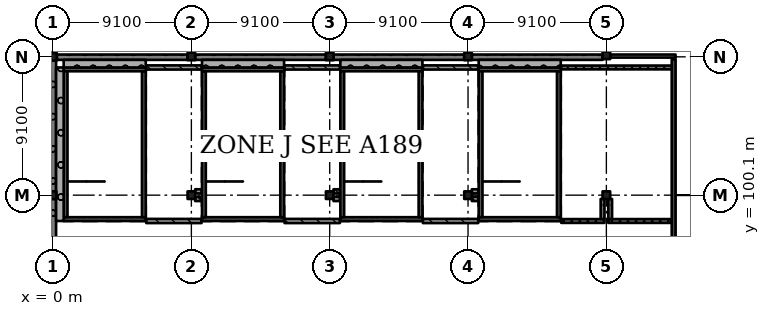
"""IFC4 building model, lengths in metres.
Left out: names, types, materials, properties, quantities, classifications, styles, units other than length and angle.
Written with IfcOpenShell. Run it as: python <this file> out.ifc"""

import sys

from ifc_helpers import new_model, si_unit, direction, frame, frame_2d, origin, origin_2d, place, context, subcontext, project, spatial, rectangle, extrude, element, fill, save


model = new_model("IFC4")
c1 = context("Model", 3, precision=1e-05, world=origin(), true_north=direction((0.0, 1.0)))
c2 = subcontext(c1, "Body", "Model", "MODEL_VIEW")
j1 = project(units=[si_unit("LENGTHUNIT", "METRE"), si_unit("PLANEANGLEUNIT", "RADIAN")], contexts=[c1])
p1 = place(None, origin())
s1 = spatial("IfcSite", under=j1, at=p1, CompositionType="ELEMENT")
p2 = place(p1, origin())
s2 = spatial("IfcBuilding", under=s1, at=p2, CompositionType="ELEMENT")
p3 = place(p2, frame((0.0, 0.0, 29.12)))
s3 = spatial("IfcBuildingStorey", under=s2, at=p3, CompositionType="ELEMENT", Elevation=29.12)
for number, where, z_axis, x_axis in (
    (1, (-0.025, 100.1, 0.0), (0.0, 0.0, 1.0), (1.0, 0.0, 0.0)),
    (2, (0.0, 109.2, 0.0), (0.0, 0.0, 1.0), (1.0, 0.0, 0.0)),
    (3, (9.1, 100.1, 0.0), (0.0, 0.0, 1.0), (1.0, 0.0, 0.0)),
    (4, (9.1, 109.225, 0.0), (0.0, 0.0, 1.0), (1.0, 0.0, 0.0)),
    (5, (18.2, 100.1, 0.0), (0.0, 0.0, 1.0), (1.0, 0.0, 0.0)),
    (6, (18.2, 109.225, 0.0), (0.0, 0.0, 1.0), (1.0, 0.0, 0.0)),
    (7, (27.3, 100.1, 0.0), (0.0, 0.0, 1.0), (1.0, 0.0, 0.0)),
    (8, (27.3, 109.225, 0.0), (0.0, 0.0, 1.0), (1.0, 0.0, 0.0)),
    (9, (36.4, 100.1, 0.0), (0.0, 0.0, 1.0), (1.0, 0.0, 0.0)),
    (10, (36.4, 109.3, 0.0), (0.0, 0.0, 1.0), (1.0, 0.0, 0.0)),
):
    element("IfcColumn", number, at=place(p3, frame(where, z_axis=z_axis, x_axis=x_axis)), inside=s3, PredefinedType="COLUMN", context=c2, shape_type="SweptSolid", body=[
        extrude(rectangle(XDim=0.5, YDim=0.5, at=origin_2d()), origin(), (0.0, 0.0, 1.0), 4.55),
    ])
p4 = place(p3, frame((40.825, 68.25, 0.0), z_axis=(0.0, 0.0, 1.0), x_axis=(0.0, 1.0, 0.0)))
e11 = element("IfcWall", 11, at=p4, inside=s3, PredefinedType="SHEAR", context=c2, shape_type="SweptSolid", body=[
    extrude(rectangle(XDim=40.775, YDim=0.25, at=frame_2d((20.387, 0.0))), origin(), (0.0, 0.0, 1.0), 4.55),
])
p5 = place(p3, frame((6.1, 98.525, 0.0), z_axis=(0.0, 0.0, 1.0), x_axis=(-1.0, 0.0, 0.0)))
e12 = element("IfcWall", 12, at=p5, inside=s3, PredefinedType="SHEAR", context=c2, shape_type="SweptSolid", body=[
    extrude(rectangle(XDim=5.4, YDim=0.25, at=frame_2d((2.7, 0.0))), origin(), (0.0, 0.0, 1.0), 4.55),
])
p6 = place(p5, frame((1.5, 0.0, 0.0)))
e13 = element("IfcOpeningElement", 13, at=p6, cuts=e12, PredefinedType="OPENING", context=c2, shape_type="SweptSolid", body=[
    extrude(rectangle(XDim=2.4, YDim=2.1, at=frame_2d((1.2, 1.05))), frame((0.0, 0.135, 0.0), z_axis=(0.0, -1.0, 0.0), x_axis=(1.0, 0.0, 0.0)), (0.0, 0.0, 1.0), 0.27),
])
p7 = place(p3, frame((6.1, 108.375, 0.0), z_axis=(0.0, 0.0, 1.0), x_axis=(-1.0, 0.0, 0.0)))
e14 = element("IfcWall", 14, at=p7, inside=s3, PredefinedType="SHEAR", context=c2, shape_type="SweptSolid", body=[
    extrude(rectangle(XDim=5.4, YDim=0.25, at=frame_2d((2.7, 0.0))), origin(), (0.0, 0.0, 1.0), 4.55),
])
for number, where, z_axis, x_axis in (
    (15, (0.825, 108.25, 0.0), (0.0, 0.0, 1.0), (0.0, -1.0, 0.0)),
    (16, (5.975, 108.25, 0.0), (0.0, 0.0, 1.0), (0.0, -1.0, 0.0)),
):
    element("IfcWall", number, at=place(p3, frame(where, z_axis=z_axis, x_axis=x_axis)), inside=s3, PredefinedType="SHEAR", context=c2, shape_type="SweptSolid", body=[
        extrude(rectangle(XDim=9.6, YDim=0.25, at=frame_2d((4.8, 0.0))), origin(), (0.0, 0.0, 1.0), 4.55),
    ])
p8 = place(p3, frame((15.2, 98.525, 0.0), z_axis=(0.0, 0.0, 1.0), x_axis=(-1.0, 0.0, 0.0)))
e17 = element("IfcWall", 17, at=p8, inside=s3, PredefinedType="SHEAR", context=c2, shape_type="SweptSolid", body=[
    extrude(rectangle(XDim=5.4, YDim=0.25, at=frame_2d((2.7, 0.0))), origin(), (0.0, 0.0, 1.0), 4.55),
])
p9 = place(p8, frame((1.5, 0.0, 0.0)))
e18 = element("IfcOpeningElement", 18, at=p9, cuts=e17, PredefinedType="OPENING", context=c2, shape_type="SweptSolid", body=[
    extrude(rectangle(XDim=2.4, YDim=2.1, at=frame_2d((1.2, 1.05))), frame((0.0, 0.135, 0.0), z_axis=(0.0, -1.0, 0.0), x_axis=(1.0, 0.0, 0.0)), (0.0, 0.0, 1.0), 0.27),
])
p10 = place(p3, frame((15.2, 108.375, 0.0), z_axis=(0.0, 0.0, 1.0), x_axis=(-1.0, 0.0, 0.0)))
e19 = element("IfcWall", 19, at=p10, inside=s3, PredefinedType="SHEAR", context=c2, shape_type="SweptSolid", body=[
    extrude(rectangle(XDim=5.4, YDim=0.25, at=frame_2d((2.7, 0.0))), origin(), (0.0, 0.0, 1.0), 4.55),
])
for number, where, z_axis, x_axis in (
    (20, (9.925, 108.25, 0.0), (0.0, 0.0, 1.0), (0.0, -1.0, 0.0)),
    (21, (15.075, 108.25, 0.0), (0.0, 0.0, 1.0), (0.0, -1.0, 0.0)),
):
    element("IfcWall", number, at=place(p3, frame(where, z_axis=z_axis, x_axis=x_axis)), inside=s3, PredefinedType="SHEAR", context=c2, shape_type="SweptSolid", body=[
        extrude(rectangle(XDim=9.6, YDim=0.25, at=frame_2d((4.8, 0.0))), origin(), (0.0, 0.0, 1.0), 4.55),
    ])
p11 = place(p3, frame((24.3, 98.525, 0.0), z_axis=(0.0, 0.0, 1.0), x_axis=(-1.0, 0.0, 0.0)))
e22 = element("IfcWall", 22, at=p11, inside=s3, PredefinedType="SHEAR", context=c2, shape_type="SweptSolid", body=[
    extrude(rectangle(XDim=5.4, YDim=0.25, at=frame_2d((2.7, 0.0))), origin(), (0.0, 0.0, 1.0), 4.55),
])
p12 = place(p11, frame((1.5, 0.0, 0.0)))
e23 = element("IfcOpeningElement", 23, at=p12, cuts=e22, PredefinedType="OPENING", context=c2, shape_type="SweptSolid", body=[
    extrude(rectangle(XDim=2.4, YDim=2.1, at=frame_2d((1.2, 1.05))), frame((0.0, 0.135, 0.0), z_axis=(0.0, -1.0, 0.0), x_axis=(1.0, 0.0, 0.0)), (0.0, 0.0, 1.0), 0.27),
])
p13 = place(p3, frame((24.3, 108.375, 0.0), z_axis=(0.0, 0.0, 1.0), x_axis=(-1.0, 0.0, 0.0)))
e24 = element("IfcWall", 24, at=p13, inside=s3, PredefinedType="SHEAR", context=c2, shape_type="SweptSolid", body=[
    extrude(rectangle(XDim=5.4, YDim=0.25, at=frame_2d((2.7, 0.0))), origin(), (0.0, 0.0, 1.0), 4.55),
])
for number, where, z_axis, x_axis in (
    (25, (19.025, 108.25, 0.0), (0.0, 0.0, 1.0), (0.0, -1.0, 0.0)),
    (26, (24.175, 108.25, 0.0), (0.0, 0.0, 1.0), (0.0, -1.0, 0.0)),
):
    element("IfcWall", number, at=place(p3, frame(where, z_axis=z_axis, x_axis=x_axis)), inside=s3, PredefinedType="SHEAR", context=c2, shape_type="SweptSolid", body=[
        extrude(rectangle(XDim=9.6, YDim=0.25, at=frame_2d((4.8, 0.0))), origin(), (0.0, 0.0, 1.0), 4.55),
    ])
p14 = place(p3, frame((33.4, 98.525, 0.0), z_axis=(0.0, 0.0, 1.0), x_axis=(-1.0, 0.0, 0.0)))
e27 = element("IfcWall", 27, at=p14, inside=s3, PredefinedType="SHEAR", context=c2, shape_type="SweptSolid", body=[
    extrude(rectangle(XDim=5.4, YDim=0.25, at=frame_2d((2.7, 0.0))), origin(), (0.0, 0.0, 1.0), 4.55),
])
p15 = place(p14, frame((1.5, 0.0, 0.0)))
e28 = element("IfcOpeningElement", 28, at=p15, cuts=e27, PredefinedType="OPENING", context=c2, shape_type="SweptSolid", body=[
    extrude(rectangle(XDim=2.4, YDim=2.1, at=frame_2d((1.2, 1.05))), frame((0.0, 0.135, 0.0), z_axis=(0.0, -1.0, 0.0), x_axis=(1.0, 0.0, 0.0)), (0.0, 0.0, 1.0), 0.27),
])
p16 = place(p3, frame((33.4, 108.375, 0.0), z_axis=(0.0, 0.0, 1.0), x_axis=(-1.0, 0.0, 0.0)))
e29 = element("IfcWall", 29, at=p16, inside=s3, PredefinedType="SHEAR", context=c2, shape_type="SweptSolid", body=[
    extrude(rectangle(XDim=5.4, YDim=0.25, at=frame_2d((2.7, 0.0))), origin(), (0.0, 0.0, 1.0), 4.55),
])
for number, where, z_axis, x_axis in (
    (30, (28.125, 108.25, 0.0), (0.0, 0.0, 1.0), (0.0, -1.0, 0.0)),
    (31, (33.275, 108.25, 0.0), (0.0, 0.0, 1.0), (0.0, -1.0, 0.0)),
):
    element("IfcWall", number, at=place(p3, frame(where, z_axis=z_axis, x_axis=x_axis)), inside=s3, PredefinedType="SHEAR", context=c2, shape_type="SweptSolid", body=[
        extrude(rectangle(XDim=9.6, YDim=0.25, at=frame_2d((4.8, 0.0))), origin(), (0.0, 0.0, 1.0), 4.55),
    ])
p17 = place(p3, frame((40.95, 109.25, 0.0), z_axis=(0.0, 0.0, 1.0), x_axis=(-1.0, 0.0, 0.0)))
e32 = element("IfcWall", 32, at=p17, inside=s3, PredefinedType="SOLIDWALL", context=c2, shape_type="SweptSolid", body=[
    extrude(rectangle(XDim=4.3, YDim=0.2, at=frame_2d((2.15, 0.0))), origin(), (0.0, 0.0, 1.0), 4.5),
])
p18 = place(p17, frame((0.65, 0.0, 0.6)))
e33 = element("IfcOpeningElement", 33, at=p18, cuts=e32, PredefinedType="OPENING", context=c2, shape_type="SweptSolid", body=[
    extrude(rectangle(XDim=3.0, YDim=3.0, at=frame_2d((1.5, 1.5))), frame((0.0, 0.11, 0.0), z_axis=(0.0, -1.0, 0.0), x_axis=(1.0, 0.0, 0.0)), (0.0, 0.0, 1.0), 0.22),
])
p19 = place(p3, frame((36.15, 109.175, 0.0), z_axis=(0.0, 0.0, 1.0), x_axis=(-1.0, 0.0, 0.0)))
e34 = element("IfcWall", 34, at=p19, inside=s3, PredefinedType="SOLIDWALL", context=c2, shape_type="SweptSolid", body=[
    extrude(rectangle(XDim=8.6, YDim=0.35, at=frame_2d((4.3, 0.0))), origin(), (0.0, 0.0, 1.0), 4.5),
])
p20 = place(p3, frame((27.05, 109.175, 0.0), z_axis=(0.0, 0.0, 1.0), x_axis=(-1.0, 0.0, 0.0)))
e35 = element("IfcWall", 35, at=p20, inside=s3, PredefinedType="SOLIDWALL", context=c2, shape_type="SweptSolid", body=[
    extrude(rectangle(XDim=8.6, YDim=0.35, at=frame_2d((4.3, 0.0))), origin(), (0.0, 0.0, 1.0), 4.5),
])
p21 = place(p3, frame((17.95, 109.175, 0.0), z_axis=(0.0, 0.0, 1.0), x_axis=(-1.0, 0.0, 0.0)))
e36 = element("IfcWall", 36, at=p21, inside=s3, PredefinedType="SOLIDWALL", context=c2, shape_type="SweptSolid", body=[
    extrude(rectangle(XDim=8.6, YDim=0.35, at=frame_2d((4.3, 0.0))), origin(), (0.0, 0.0, 1.0), 4.5),
])
p22 = place(p3, frame((8.85, 109.175, 0.0), z_axis=(0.0, 0.0, 1.0), x_axis=(-1.0, 0.0, 0.0)))
e37 = element("IfcWall", 37, at=p22, inside=s3, PredefinedType="SOLIDWALL", context=c2, shape_type="SweptSolid", body=[
    extrude(rectangle(XDim=8.6, YDim=0.35, at=frame_2d((4.3, 0.0))), origin(), (0.0, 0.0, 1.0), 4.5),
])
p23 = place(p3, frame((0.025, 108.95, 0.0), z_axis=(0.0, 0.0, 1.0), x_axis=(0.0, -1.0, 0.0)))
e38 = element("IfcWall", 38, at=p23, inside=s3, PredefinedType="SOLIDWALL", context=c2, shape_type="SweptSolid", body=[
    extrude(rectangle(XDim=8.6, YDim=0.35, at=frame_2d((4.3, 0.0))), origin(), (0.0, 0.0, 1.0), 4.5),
])
p24 = place(p3, frame((0.025, 99.85, 0.0), z_axis=(0.0, 0.0, 1.0), x_axis=(0.0, -1.0, 0.0)))
e39 = element("IfcWall", 39, at=p24, inside=s3, PredefinedType="SOLIDWALL", context=c2, shape_type="SweptSolid", body=[
    extrude(rectangle(XDim=8.6, YDim=0.35, at=frame_2d((4.3, 0.0))), origin(), (0.0, 0.0, 1.0), 4.5),
])
p25 = place(p3, frame((0.7, 108.75, 0.0), z_axis=(0.0, 0.0, 1.0), x_axis=(1.0, 0.0, 0.0)))
e40 = element("IfcWall", 40, at=p25, inside=s3, PredefinedType="SOLIDWALL", context=c2, shape_type="SweptSolid", body=[
    extrude(rectangle(XDim=5.4, YDim=0.5, at=frame_2d((2.7, 0.0))), origin(), (0.0, 0.0, 1.0), 3.88),
])
p26 = place(p3, frame((0.45, 98.4, 0.0), z_axis=(0.0, 0.0, 1.0), x_axis=(0.0, 1.0, 0.0)))
e41 = element("IfcWall", 41, at=p26, inside=s3, PredefinedType="SOLIDWALL", context=c2, shape_type="SweptSolid", body=[
    extrude(rectangle(XDim=10.1, YDim=0.5, at=frame_2d((5.05, 0.0))), origin(), (0.0, 0.0, 1.0), 3.88),
])
p27 = place(p3, frame((9.8, 108.75, 0.0), z_axis=(0.0, 0.0, 1.0), x_axis=(1.0, 0.0, 0.0)))
e42 = element("IfcWall", 42, at=p27, inside=s3, PredefinedType="SOLIDWALL", context=c2, shape_type="SweptSolid", body=[
    extrude(rectangle(XDim=5.4, YDim=0.5, at=frame_2d((2.7, 0.0))), origin(), (0.0, 0.0, 1.0), 3.88),
])
p28 = place(p3, frame((18.9, 108.75, 0.0), z_axis=(0.0, 0.0, 1.0), x_axis=(1.0, 0.0, 0.0)))
e43 = element("IfcWall", 43, at=p28, inside=s3, PredefinedType="SOLIDWALL", context=c2, shape_type="SweptSolid", body=[
    extrude(rectangle(XDim=5.4, YDim=0.5, at=frame_2d((2.7, 0.0))), origin(), (0.0, 0.0, 1.0), 3.88),
])
p29 = place(p3, frame((28.0, 108.75, 0.0), z_axis=(0.0, 0.0, 1.0), x_axis=(1.0, 0.0, 0.0)))
e44 = element("IfcWall", 44, at=p29, inside=s3, PredefinedType="SOLIDWALL", context=c2, shape_type="SweptSolid", body=[
    extrude(rectangle(XDim=5.4, YDim=0.5, at=frame_2d((2.7, 0.0))), origin(), (0.0, 0.0, 1.0), 3.88),
])
p30 = place(p3, frame((6.13, 98.4, 0.0), z_axis=(0.0, 0.0, 1.0), x_axis=(1.0, 0.0, 0.0)))
e45 = element("IfcWall", 45, at=p30, inside=s3, PredefinedType="SOLIDWALL", context=c2, shape_type="SweptSolid", body=[
    extrude(rectangle(XDim=3.64, YDim=0.275, at=frame_2d((1.82, 0.0))), origin(), (0.0, 0.0, 1.0), 3.88),
])
p31 = place(p30, frame((1.25, 0.0, 0.0)))
e46 = element("IfcOpeningElement", 46, at=p31, cuts=e45, PredefinedType="OPENING", context=c2, shape_type="SweptSolid", body=[
    extrude(rectangle(XDim=1.2, YDim=2.4, at=frame_2d((0.6, 1.2))), frame((0.0, 0.147, 0.0), z_axis=(0.0, -1.0, 0.0), x_axis=(1.0, 0.0, 0.0)), (0.0, 0.0, 1.0), 0.295),
])
p32 = place(p3, frame((6.13, 108.5, 0.0), z_axis=(0.0, 0.0, 1.0), x_axis=(1.0, 0.0, 0.0)))
e47 = element("IfcWall", 47, at=p32, inside=s3, PredefinedType="SOLIDWALL", context=c2, shape_type="SweptSolid", body=[
    extrude(rectangle(XDim=3.64, YDim=0.275, at=frame_2d((1.82, 0.0))), origin(), (0.0, 0.0, 1.0), 3.88),
])
for number, where, z_axis, x_axis in (
    (48, (9.35, 99.85, 0.0), (0.0, 0.0, 1.0), (1.0, 0.0, 0.0)),
    (49, (9.77, 100.35, 0.0), (0.0, 0.0, 1.0), (-1.0, 0.0, 0.0)),
):
    element("IfcWall", number, at=place(p3, frame(where, z_axis=z_axis, x_axis=x_axis)), inside=s3, PredefinedType="SOLIDWALL", context=c2, shape_type="SweptSolid", body=[
        extrude(rectangle(XDim=0.42, YDim=0.275, at=frame_2d((0.21, 0.0))), origin(), (0.0, 0.0, 1.0), 3.88),
    ])
p33 = place(p3, frame((15.23, 98.4, 0.0), z_axis=(0.0, 0.0, 1.0), x_axis=(1.0, 0.0, 0.0)))
e50 = element("IfcWall", 50, at=p33, inside=s3, PredefinedType="SOLIDWALL", context=c2, shape_type="SweptSolid", body=[
    extrude(rectangle(XDim=3.64, YDim=0.275, at=frame_2d((1.82, 0.0))), origin(), (0.0, 0.0, 1.0), 3.88),
])
p34 = place(p33, frame((1.25, 0.0, 0.0)))
e51 = element("IfcOpeningElement", 51, at=p34, cuts=e50, PredefinedType="OPENING", context=c2, shape_type="SweptSolid", body=[
    extrude(rectangle(XDim=1.2, YDim=2.4, at=frame_2d((0.6, 1.2))), frame((0.0, 0.147, 0.0), z_axis=(0.0, -1.0, 0.0), x_axis=(1.0, 0.0, 0.0)), (0.0, 0.0, 1.0), 0.295),
])
p35 = place(p3, frame((15.23, 108.5, 0.0), z_axis=(0.0, 0.0, 1.0), x_axis=(1.0, 0.0, 0.0)))
e52 = element("IfcWall", 52, at=p35, inside=s3, PredefinedType="SOLIDWALL", context=c2, shape_type="SweptSolid", body=[
    extrude(rectangle(XDim=3.64, YDim=0.275, at=frame_2d((1.82, 0.0))), origin(), (0.0, 0.0, 1.0), 3.88),
])
for number, where, z_axis, x_axis in (
    (53, (18.45, 99.85, 0.0), (0.0, 0.0, 1.0), (1.0, 0.0, 0.0)),
    (54, (18.87, 100.35, 0.0), (0.0, 0.0, 1.0), (-1.0, 0.0, 0.0)),
):
    element("IfcWall", number, at=place(p3, frame(where, z_axis=z_axis, x_axis=x_axis)), inside=s3, PredefinedType="SOLIDWALL", context=c2, shape_type="SweptSolid", body=[
        extrude(rectangle(XDim=0.42, YDim=0.275, at=frame_2d((0.21, 0.0))), origin(), (0.0, 0.0, 1.0), 3.88),
    ])
p36 = place(p3, frame((24.33, 98.4, 0.0), z_axis=(0.0, 0.0, 1.0), x_axis=(1.0, 0.0, 0.0)))
e55 = element("IfcWall", 55, at=p36, inside=s3, PredefinedType="SOLIDWALL", context=c2, shape_type="SweptSolid", body=[
    extrude(rectangle(XDim=3.64, YDim=0.275, at=frame_2d((1.82, 0.0))), origin(), (0.0, 0.0, 1.0), 3.88),
])
p37 = place(p36, frame((1.25, 0.0, 0.0)))
e56 = element("IfcOpeningElement", 56, at=p37, cuts=e55, PredefinedType="OPENING", context=c2, shape_type="SweptSolid", body=[
    extrude(rectangle(XDim=1.2, YDim=2.4, at=frame_2d((0.6, 1.2))), frame((0.0, 0.147, 0.0), z_axis=(0.0, -1.0, 0.0), x_axis=(1.0, 0.0, 0.0)), (0.0, 0.0, 1.0), 0.295),
])
p38 = place(p3, frame((24.33, 108.5, 0.0), z_axis=(0.0, 0.0, 1.0), x_axis=(1.0, 0.0, 0.0)))
e57 = element("IfcWall", 57, at=p38, inside=s3, PredefinedType="SOLIDWALL", context=c2, shape_type="SweptSolid", body=[
    extrude(rectangle(XDim=3.64, YDim=0.275, at=frame_2d((1.82, 0.0))), origin(), (0.0, 0.0, 1.0), 3.88),
])
for number, where, z_axis, x_axis in (
    (58, (27.55, 99.85, 0.0), (0.0, 0.0, 1.0), (1.0, 0.0, 0.0)),
    (59, (27.97, 100.35, 0.0), (0.0, 0.0, 1.0), (-1.0, 0.0, 0.0)),
):
    element("IfcWall", number, at=place(p3, frame(where, z_axis=z_axis, x_axis=x_axis)), inside=s3, PredefinedType="SOLIDWALL", context=c2, shape_type="SweptSolid", body=[
        extrude(rectangle(XDim=0.42, YDim=0.275, at=frame_2d((0.21, 0.0))), origin(), (0.0, 0.0, 1.0), 3.88),
    ])
p39 = place(p3, frame((33.43, 98.4, 0.0), z_axis=(0.0, 0.0, 1.0), x_axis=(1.0, 0.0, 0.0)))
e60 = element("IfcWall", 60, at=p39, inside=s3, PredefinedType="SOLIDWALL", context=c2, shape_type="SweptSolid", body=[
    extrude(rectangle(XDim=2.845, YDim=0.25, at=frame_2d((1.422, 0.0))), origin(), (0.0, 0.0, 1.0), 3.88),
])
p40 = place(p3, frame((33.43, 108.5, 0.0), z_axis=(0.0, 0.0, 1.0), x_axis=(1.0, 0.0, 0.0)))
e61 = element("IfcWall", 61, at=p40, inside=s3, PredefinedType="SOLIDWALL", context=c2, shape_type="SweptSolid", body=[
    extrude(rectangle(XDim=7.27, YDim=0.25, at=frame_2d((3.635, 0.0))), origin(), (0.0, 0.0, 1.0), 3.88),
])
p41 = place(p3, frame((36.15, 98.525, 0.0), z_axis=(0.0, 0.0, 1.0), x_axis=(0.0, 1.0, 0.0)))
e62 = element("IfcWall", 62, at=p41, inside=s3, PredefinedType="SOLIDWALL", context=c2, shape_type="SweptSolid", body=[
    extrude(rectangle(XDim=1.325, YDim=0.25, at=frame_2d((0.663, 0.0))), origin(), (0.0, 0.0, 1.0), 3.88),
])
p42 = place(p3, frame((36.525, 98.4, 0.0), z_axis=(0.0, 0.0, 1.0), x_axis=(1.0, 0.0, 0.0)))
e63 = element("IfcWall", 63, at=p42, inside=s3, PredefinedType="SOLIDWALL", context=c2, shape_type="SweptSolid", body=[
    extrude(rectangle(XDim=4.175, YDim=0.25, at=frame_2d((2.087, 0.0))), origin(), (0.0, 0.0, 1.0), 3.88),
])
p43 = place(p42, frame((1.55, 0.0, 0.0)))
e64 = element("IfcOpeningElement", 64, at=p43, cuts=e63, PredefinedType="OPENING", context=c2, shape_type="SweptSolid", body=[
    extrude(rectangle(XDim=1.0, YDim=2.1, at=frame_2d((0.5, 1.05))), frame((0.0, 0.135, 0.0), z_axis=(0.0, -1.0, 0.0), x_axis=(1.0, 0.0, 0.0)), (0.0, 0.0, 1.0), 0.27),
])
p44 = place(p3, frame((36.65, 99.85, 0.0), z_axis=(0.0, 0.0, 1.0), x_axis=(0.0, -1.0, 0.0)))
e65 = element("IfcWall", 65, at=p44, inside=s3, PredefinedType="SOLIDWALL", context=c2, shape_type="SweptSolid", body=[
    extrude(rectangle(XDim=1.325, YDim=0.25, at=frame_2d((0.663, 0.0))), origin(), (0.0, 0.0, 1.0), 3.88),
])
p45 = place(p18, origin())
e66 = element("IfcWindow", 66, at=p45, inside=s3, PartitioningType="SINGLE_PANEL", PredefinedType="WINDOW", context=c2, shape_type="SweptSolid", body=[
    extrude(rectangle(XDim=3.0, YDim=3.0, at=frame_2d((1.5, 1.5))), frame((0.0, 0.03, 0.0), z_axis=(0.0, -1.0, 0.0), x_axis=(1.0, 0.0, 0.0)), (0.0, 0.0, 1.0), 0.06),
])
fill(e33, e66)
p46 = place(p31, origin())
e67 = element("IfcDoor", 67, at=p46, inside=s3, OperationType="SINGLE_SWING_LEFT", PredefinedType="DOOR", context=c2, shape_type="SweptSolid", body=[
    extrude(rectangle(XDim=1.2, YDim=2.4, at=frame_2d((0.6, 1.2))), frame((0.0, 0.025, 0.0), z_axis=(0.0, -1.0, 0.0), x_axis=(1.0, 0.0, 0.0)), (0.0, 0.0, 1.0), 0.05),
])
fill(e46, e67)
p47 = place(p34, origin())
e68 = element("IfcDoor", 68, at=p47, inside=s3, OperationType="SINGLE_SWING_LEFT", PredefinedType="DOOR", context=c2, shape_type="SweptSolid", body=[
    extrude(rectangle(XDim=1.2, YDim=2.4, at=frame_2d((0.6, 1.2))), frame((0.0, 0.025, 0.0), z_axis=(0.0, -1.0, 0.0), x_axis=(1.0, 0.0, 0.0)), (0.0, 0.0, 1.0), 0.05),
])
fill(e51, e68)
p48 = place(p37, origin())
e69 = element("IfcDoor", 69, at=p48, inside=s3, OperationType="SINGLE_SWING_LEFT", PredefinedType="DOOR", context=c2, shape_type="SweptSolid", body=[
    extrude(rectangle(XDim=1.2, YDim=2.4, at=frame_2d((0.6, 1.2))), frame((0.0, 0.025, 0.0), z_axis=(0.0, -1.0, 0.0), x_axis=(1.0, 0.0, 0.0)), (0.0, 0.0, 1.0), 0.05),
])
fill(e56, e69)
p49 = place(p43, origin())
e70 = element("IfcDoor", 70, at=p49, inside=s3, OperationType="SINGLE_SWING_RIGHT", PredefinedType="DOOR", context=c2, shape_type="SweptSolid", body=[
    extrude(rectangle(XDim=1.0, YDim=2.1, at=frame_2d((0.5, 1.05))), frame((0.0, 0.025, 0.0), z_axis=(0.0, -1.0, 0.0), x_axis=(1.0, 0.0, 0.0)), (0.0, 0.0, 1.0), 0.05),
])
fill(e64, e70)
p50 = place(p6, origin())
e71 = element("IfcDoor", 71, at=p50, inside=s3, OperationType="DOUBLE_DOOR_SINGLE_SWING", PredefinedType="DOOR", context=c2, shape_type="SweptSolid", body=[
    extrude(rectangle(XDim=2.4, YDim=2.1, at=frame_2d((1.2, 1.05))), frame((0.0, 0.025, 0.0), z_axis=(0.0, -1.0, 0.0), x_axis=(1.0, 0.0, 0.0)), (0.0, 0.0, 1.0), 0.05),
])
fill(e13, e71)
p51 = place(p9, origin())
e72 = element("IfcDoor", 72, at=p51, inside=s3, OperationType="DOUBLE_DOOR_SINGLE_SWING", PredefinedType="DOOR", context=c2, shape_type="SweptSolid", body=[
    extrude(rectangle(XDim=2.4, YDim=2.1, at=frame_2d((1.2, 1.05))), frame((0.0, 0.025, 0.0), z_axis=(0.0, -1.0, 0.0), x_axis=(1.0, 0.0, 0.0)), (0.0, 0.0, 1.0), 0.05),
])
fill(e18, e72)
p52 = place(p12, origin())
e73 = element("IfcDoor", 73, at=p52, inside=s3, OperationType="DOUBLE_DOOR_SINGLE_SWING", PredefinedType="DOOR", context=c2, shape_type="SweptSolid", body=[
    extrude(rectangle(XDim=2.4, YDim=2.1, at=frame_2d((1.2, 1.05))), frame((0.0, 0.025, 0.0), z_axis=(0.0, -1.0, 0.0), x_axis=(1.0, 0.0, 0.0)), (0.0, 0.0, 1.0), 0.05),
])
fill(e23, e73)
p53 = place(p15, origin())
e74 = element("IfcDoor", 74, at=p53, inside=s3, OperationType="DOUBLE_DOOR_SINGLE_SWING", PredefinedType="DOOR", context=c2, shape_type="SweptSolid", body=[
    extrude(rectangle(XDim=2.4, YDim=2.1, at=frame_2d((1.2, 1.05))), frame((0.0, 0.025, 0.0), z_axis=(0.0, -1.0, 0.0), x_axis=(1.0, 0.0, 0.0)), (0.0, 0.0, 1.0), 0.05),
])
fill(e28, e74)
save(model, sys.argv[1])
